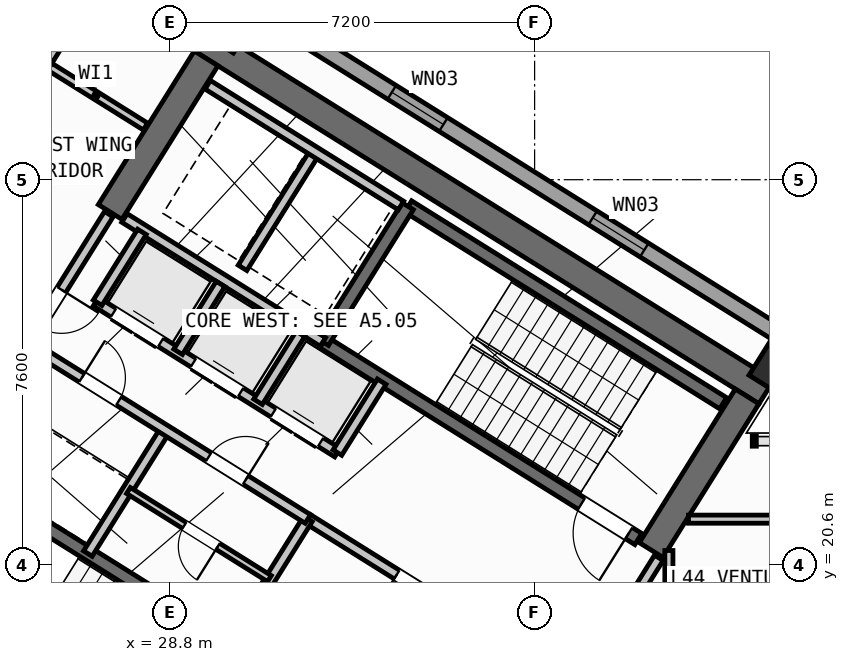
"""IFC4 building model, lengths in metres.
Left out: names, types, materials, properties, quantities, classifications, styles, units other than length and angle.
Written with IfcOpenShell. Run it as: python <this file> out.ifc"""

import sys

from ifc_helpers import new_model, si_unit, direction, frame, frame_2d, origin, origin_2d, place, context, subcontext, project, spatial, rectangle, hollow_rectangle, extrude, source, transform, mapped, element, fill, save


model = new_model("IFC4")
c1 = context("Model", 3, precision=1e-05, world=origin(), true_north=direction((0.0, 1.0)))
c2 = subcontext(c1, "Body", "Model", "MODEL_VIEW")
j1 = project(units=[si_unit("LENGTHUNIT", "METRE"), si_unit("PLANEANGLEUNIT", "RADIAN")], contexts=[c1])
p1 = place(None, origin())
s1 = spatial("IfcSite", under=j1, at=p1, CompositionType="ELEMENT")
p2 = place(p1, origin())
s2 = spatial("IfcBuilding", under=s1, at=p2, CompositionType="ELEMENT")
p3 = place(p2, frame((0.0, 0.0, 174.9)))
s3 = spatial("IfcBuildingStorey", under=s2, at=p3, CompositionType="ELEMENT", Elevation=174.9)
p4 = place(p3, frame((40.573, 24.01, 0.0), z_axis=(0.0, 0.0, 1.0), x_axis=(-0.848047359947, 0.529920442413, 0.0)))
e1 = element("IfcWall", 1, at=p4, inside=s3, PredefinedType="SHEAR", context=c2, shape_type="SweptSolid", body=[
    extrude(rectangle(XDim=13.14, YDim=0.55, at=frame_2d((6.57, 0.0))), origin(), (0.0, 0.0, 1.0), 4.22),
])
p5 = place(p3, frame((40.194, 23.922, 0.0), z_axis=(0.0, 0.0, 1.0), x_axis=(-0.529888438328, -0.848067357541, 0.0)))
e2 = element("IfcWall", 2, at=p5, inside=s3, PredefinedType="SHEAR", context=c2, shape_type="SweptSolid", body=[
    extrude(rectangle(XDim=3.575, YDim=0.55, at=frame_2d((1.788, 0.0))), origin(), (0.0, 0.0, 1.0), 4.22),
])
p6 = place(p3, frame((29.517, 30.594, 0.0), z_axis=(0.0, 0.0, 1.0), x_axis=(-0.529906864564, -0.848055844204, 0.0)))
e3 = element("IfcWall", 3, at=p6, inside=s3, PredefinedType="SHEAR", context=c2, shape_type="SweptSolid", body=[
    extrude(rectangle(XDim=3.575, YDim=0.55, at=frame_2d((1.788, 0.0))), origin(), (0.0, 0.0, 1.0), 4.22),
])
m1 = source(origin(), c2, "Body", "SweptSolid", [
    extrude(hollow_rectangle(XDim=0.8, YDim=0.8, WallThickness=0.032, at=origin_2d()), origin(), (0.0, 0.0, 1.0), 4.5),
])
for number, where, z_axis, x_axis in (
    (4, (40.783, 24.469, 0.0), (0.0, 0.0, 1.0), (-0.848, 0.53, 0.0)),
    (5, (29.928, 31.251, 0.0), (0.0, 0.0, 1.0), (-0.848, 0.53, 0.0)),
):
    element("IfcColumn", number, at=place(p3, frame(where, z_axis=z_axis, x_axis=x_axis)), inside=s3, PredefinedType="COLUMN", context=c2, shape_type="MappedRepresentation", body=[
        mapped(m1, transform((0.0, 0.0, 0.0), scale=1.0)),
    ])
p7 = place(p3, frame((29.268, 6.429, 0.0), z_axis=(0.0, 0.0, 1.0), x_axis=(-0.848049971435, 0.529916263149, 0.0)))
e6 = element("IfcWall", 6, at=p7, inside=s3, PredefinedType="STANDARD", context=c2, shape_type="SweptSolid", body=[
    extrude(rectangle(XDim=31.588, YDim=0.32, at=frame_2d((15.794, 0.0))), origin(), (0.0, 0.0, 1.0), 4.22),
])
p8 = place(p7, frame((27.641, 0.0, 0.0)))
e7 = element("IfcOpeningElement", 7, at=p8, cuts=e6, PredefinedType="OPENING", context=c2, shape_type="SweptSolid", body=[
    extrude(rectangle(XDim=1.2, YDim=2.15, at=frame_2d((0.6, 1.075))), frame((0.0, 0.17, 0.0), z_axis=(0.0, -1.0, 0.0), x_axis=(1.0, 0.0, 0.0)), (0.0, 0.0, 1.0), 0.34),
])
p9 = place(p7, frame((2.954, 0.0, 0.8)))
e8 = element("IfcOpeningElement", 8, at=p9, cuts=e6, PredefinedType="OPENING", context=c2, shape_type="SweptSolid", body=[
    extrude(rectangle(XDim=2.1, YDim=1.55, at=frame_2d((1.05, 0.775))), frame((0.0, 0.17, 0.0), z_axis=(0.0, -1.0, 0.0), x_axis=(1.0, 0.0, 0.0)), (0.0, 0.0, 1.0), 0.34),
])
p10 = place(p7, frame((8.253, 0.0, 0.8)))
e9 = element("IfcOpeningElement", 9, at=p10, cuts=e6, PredefinedType="OPENING", context=c2, shape_type="SweptSolid", body=[
    extrude(rectangle(XDim=2.1, YDim=1.55, at=frame_2d((1.05, 0.775))), frame((0.0, 0.17, 0.0), z_axis=(0.0, -1.0, 0.0), x_axis=(1.0, 0.0, 0.0)), (0.0, 0.0, 1.0), 0.34),
])
p11 = place(p7, frame((20.2, 0.0, 1.0)))
e10 = element("IfcOpeningElement", 10, at=p11, cuts=e6, PredefinedType="OPENING", context=c2, shape_type="SweptSolid", body=[
    extrude(rectangle(XDim=0.9, YDim=1.25, at=frame_2d((0.45, 0.625))), frame((0.0, 0.17, 0.0), z_axis=(0.0, -1.0, 0.0), x_axis=(1.0, 0.0, 0.0)), (0.0, 0.0, 1.0), 0.34),
])
p12 = place(p3, frame((14.138, 41.825, 0.0), z_axis=(0.0, 0.0, 1.0), x_axis=(0.848046498049, -0.529921821731, 0.0)))
e11 = element("IfcWall", 11, at=p12, inside=s3, PredefinedType="STANDARD", context=c2, shape_type="SweptSolid", body=[
    extrude(rectangle(XDim=31.588, YDim=0.32, at=frame_2d((15.794, 0.0))), origin(), (0.0, 0.0, 1.0), 4.22),
])
p13 = place(p12, frame((3.339, 0.0, 0.0)))
e12 = element("IfcOpeningElement", 12, at=p13, cuts=e11, PredefinedType="OPENING", context=c2, shape_type="SweptSolid", body=[
    extrude(rectangle(XDim=1.05, YDim=2.15, at=frame_2d((0.525, 1.075))), frame((0.0, 0.17, 0.0), z_axis=(0.0, -1.0, 0.0), x_axis=(1.0, 0.0, 0.0)), (0.0, 0.0, 1.0), 0.34),
])
p14 = place(p12, frame((1.819, 0.0, 1.0)))
e13 = element("IfcOpeningElement", 13, at=p14, cuts=e11, PredefinedType="OPENING", context=c2, shape_type="SweptSolid", body=[
    extrude(rectangle(XDim=0.9, YDim=1.25, at=frame_2d((0.45, 0.625))), frame((0.0, 0.17, 0.0), z_axis=(0.0, -1.0, 0.0), x_axis=(1.0, 0.0, 0.0)), (0.0, 0.0, 1.0), 0.34),
])
p15 = place(p12, frame((8.494, 0.0, 0.85)))
e14 = element("IfcOpeningElement", 14, at=p15, cuts=e11, PredefinedType="OPENING", context=c2, shape_type="SweptSolid", body=[
    extrude(rectangle(XDim=1.8, YDim=1.5, at=frame_2d((0.9, 0.75))), frame((0.0, 0.17, 0.0), z_axis=(0.0, -1.0, 0.0), x_axis=(1.0, 0.0, 0.0)), (0.0, 0.0, 1.0), 0.34),
])
p16 = place(p12, frame((14.636, 0.0, 1.0)))
e15 = element("IfcOpeningElement", 15, at=p16, cuts=e11, PredefinedType="OPENING", context=c2, shape_type="SweptSolid", body=[
    extrude(rectangle(XDim=0.9, YDim=1.25, at=frame_2d((0.45, 0.625))), frame((0.0, 0.17, 0.0), z_axis=(0.0, -1.0, 0.0), x_axis=(1.0, 0.0, 0.0)), (0.0, 0.0, 1.0), 0.34),
])
p17 = place(p12, frame((22.456, 0.0, 0.95)))
e16 = element("IfcOpeningElement", 16, at=p17, cuts=e11, PredefinedType="OPENING", context=c2, shape_type="SweptSolid", body=[
    extrude(rectangle(XDim=1.2, YDim=1.4, at=frame_2d((0.6, 0.7))), frame((0.0, 0.17, 0.0), z_axis=(0.0, -1.0, 0.0), x_axis=(1.0, 0.0, 0.0)), (0.0, 0.0, 1.0), 0.34),
])
p18 = place(p12, frame((27.131, 0.0, 0.95)))
e17 = element("IfcOpeningElement", 17, at=p18, cuts=e11, PredefinedType="OPENING", context=c2, shape_type="SweptSolid", body=[
    extrude(rectangle(XDim=1.2, YDim=1.4, at=frame_2d((0.6, 0.7))), frame((0.0, 0.17, 0.0), z_axis=(0.0, -1.0, 0.0), x_axis=(1.0, 0.0, 0.0)), (0.0, 0.0, 1.0), 0.34),
])
p19 = place(p3, frame((31.28, 18.261, 0.0), z_axis=(0.0, 0.0, 1.0), x_axis=(-0.848051618787, 0.529913626805, 0.0)))
e18 = element("IfcWall", 18, at=p19, inside=s3, PredefinedType="SHEAR", context=c2, shape_type="SweptSolid", body=[
    extrude(rectangle(XDim=7.46, YDim=0.26, at=frame_2d((3.73, 0.0))), origin(), (0.0, 0.0, 1.0), 4.22),
])
p20 = place(p19, frame((0.36, 0.0, 0.0)))
e19 = element("IfcOpeningElement", 19, at=p20, cuts=e18, PredefinedType="OPENING", context=c2, shape_type="SweptSolid", body=[
    extrude(rectangle(XDim=0.86, YDim=2.05, at=frame_2d((0.43, 1.025))), frame((0.0, 0.14, 0.0), z_axis=(0.0, -1.0, 0.0), x_axis=(1.0, 0.0, 0.0)), (0.0, 0.0, 1.0), 0.28),
])
p21 = place(p3, frame((39.721, 23.788, 0.0), z_axis=(0.0, 0.0, 1.0), x_axis=(-0.848054434086, 0.529909121291, 0.0)))
e20 = element("IfcWall", 20, at=p21, inside=s3, PredefinedType="SHEAR", context=c2, shape_type="SweptSolid", body=[
    extrude(rectangle(XDim=7.33, YDim=0.26, at=frame_2d((3.665, 0.0))), origin(), (0.0, 0.0, 1.0), 4.22),
])
p22 = place(p3, frame((38.046, 21.108, 0.0), z_axis=(0.0, 0.0, 1.0), x_axis=(-0.848054434086, 0.529909121291, 0.0)))
e21 = element("IfcWall", 21, at=p22, inside=s3, PredefinedType="SHEAR", context=c2, shape_type="SweptSolid", body=[
    extrude(rectangle(XDim=7.33, YDim=0.26, at=frame_2d((3.665, 0.0))), origin(), (0.0, 0.0, 1.0), 4.22),
])
p23 = place(p22, frame((0.22, 0.0, 0.0)))
e22 = element("IfcOpeningElement", 22, at=p23, cuts=e21, PredefinedType="OPENING", context=c2, shape_type="SweptSolid", body=[
    extrude(rectangle(XDim=1.1, YDim=2.1, at=frame_2d((0.55, 1.05))), frame((0.0, 0.14, 0.0), z_axis=(0.0, -1.0, 0.0), x_axis=(1.0, 0.0, 0.0)), (0.0, 0.0, 1.0), 0.28),
])
p24 = place(p3, frame((33.496, 27.677, 0.0), z_axis=(0.0, 0.0, 1.0), x_axis=(-0.529908658664, -0.84805472316, 0.0)))
e23 = element("IfcWall", 23, at=p24, inside=s3, PredefinedType="SHEAR", context=c2, shape_type="SweptSolid", body=[
    extrude(rectangle(XDim=3.16, YDim=0.26, at=frame_2d((1.58, 0.0))), origin(), (0.0, 0.0, 1.0), 4.22),
])
p25 = place(p3, frame((36.417, 18.447, 0.0), z_axis=(0.0, 0.0, 1.0), x_axis=(-0.848064879198, 0.529892404805, 0.0)))
e24 = element("IfcWall", 24, at=p25, inside=s3, PredefinedType="STANDARD", context=c2, shape_type="SweptSolid", body=[
    extrude(rectangle(XDim=5.768, YDim=0.2, at=frame_2d((2.884, 0.0))), origin(), (0.0, 0.0, 1.0), 4.21),
])
p26 = place(p25, frame((2.548, 0.0, 0.0)))
e25 = element("IfcOpeningElement", 25, at=p26, cuts=e24, PredefinedType="OPENING", context=c2, shape_type="SweptSolid", body=[
    extrude(rectangle(XDim=1.15, YDim=2.1, at=frame_2d((0.575, 1.05))), frame((0.0, 0.11, 0.0), z_axis=(0.0, -1.0, 0.0), x_axis=(1.0, 0.0, 0.0)), (0.0, 0.0, 1.0), 0.22),
])
p27 = place(p3, frame((31.822, 24.998, 0.0), z_axis=(0.0, 0.0, 1.0), x_axis=(-0.848036912365, 0.52993716162, 0.0)))
e26 = element("IfcWall", 26, at=p27, inside=s3, PredefinedType="STANDARD", context=c2, shape_type="SweptSolid", body=[
    extrude(rectangle(XDim=4.618, YDim=0.2, at=frame_2d((2.309, 0.0))), origin(), (0.0, 0.0, 1.0), 4.21),
])
p28 = place(p3, frame((32.108, 22.814, 0.0), z_axis=(0.0, 0.0, 1.0), x_axis=(-0.848042229521, 0.529928652696, 0.0)))
e27 = element("IfcWall", 27, at=p28, inside=s3, PredefinedType="STANDARD", context=c2, shape_type="SweptSolid", body=[
    extrude(rectangle(XDim=5.62, YDim=0.2, at=frame_2d((2.81, 0.0))), origin(), (0.0, 0.0, 1.0), 4.21),
])
p29 = place(p28, frame((0.39, 0.0, 0.0)))
e28 = element("IfcOpeningElement", 28, at=p29, cuts=e27, PredefinedType="OPENING", context=c2, shape_type="SweptSolid", body=[
    extrude(rectangle(XDim=1.1, YDim=2.15, at=frame_2d((0.55, 1.075))), frame((0.0, 0.11, 0.0), z_axis=(0.0, -1.0, 0.0), x_axis=(1.0, 0.0, 0.0)), (0.0, 0.0, 1.0), 0.22),
])
p30 = place(p28, frame((2.25, 0.0, 0.0)))
e29 = element("IfcOpeningElement", 29, at=p30, cuts=e27, PredefinedType="OPENING", context=c2, shape_type="SweptSolid", body=[
    extrude(rectangle(XDim=1.1, YDim=2.15, at=frame_2d((0.55, 1.075))), frame((0.0, 0.11, 0.0), z_axis=(0.0, -1.0, 0.0), x_axis=(1.0, 0.0, 0.0)), (0.0, 0.0, 1.0), 0.22),
])
p31 = place(p28, frame((4.11, 0.0, 0.0)))
e30 = element("IfcOpeningElement", 30, at=p31, cuts=e27, PredefinedType="OPENING", context=c2, shape_type="SweptSolid", body=[
    extrude(rectangle(XDim=1.1, YDim=2.15, at=frame_2d((0.55, 1.075))), frame((0.0, 0.11, 0.0), z_axis=(0.0, -1.0, 0.0), x_axis=(1.0, 0.0, 0.0)), (0.0, 0.0, 1.0), 0.22),
])
p32 = place(p3, frame((32.982, 24.213, 0.0), z_axis=(0.0, 0.0, 1.0), x_axis=(-0.529839334948, -0.84809803628, 0.0)))
e31 = element("IfcWall", 31, at=p32, inside=s3, PredefinedType="STANDARD", context=c2, shape_type="SweptSolid", body=[
    extrude(rectangle(XDim=1.65, YDim=0.2, at=frame_2d((0.825, 0.0))), origin(), (0.0, 0.0, 1.0), 4.21),
])
p33 = place(p3, frame((28.25, 27.17, 0.0), z_axis=(0.0, 0.0, 1.0), x_axis=(-0.529905827651, -0.848056492117, 0.0)))
e32 = element("IfcWall", 32, at=p33, inside=s3, PredefinedType="STANDARD", context=c2, shape_type="SweptSolid", body=[
    extrude(rectangle(XDim=1.65, YDim=0.2, at=frame_2d((0.825, 0.0))), origin(), (0.0, 0.0, 1.0), 4.21),
])
p34 = place(p3, frame((31.645, 28.716, 0.0), z_axis=(0.0, 0.0, 1.0), x_axis=(-0.52986693015, -0.848080795876, 0.0)))
e33 = element("IfcWall", 33, at=p34, inside=s3, PredefinedType="STANDARD", context=c2, shape_type="SweptSolid", body=[
    extrude(rectangle(XDim=2.66, YDim=0.2, at=frame_2d((1.33, 0.0))), origin(), (0.0, 0.0, 1.0), 4.21),
])
p35 = place(p3, frame((33.363, 27.69, 0.0), z_axis=(0.0, 0.0, 1.0), x_axis=(-0.848047090064, 0.529920874315, 0.0)))
e34 = element("IfcWall", 34, at=p35, inside=s3, PredefinedType="STANDARD", context=c2, shape_type="SweptSolid", body=[
    extrude(rectangle(XDim=4.498, YDim=0.2, at=frame_2d((2.249, 0.0))), origin(), (0.0, 0.0, 1.0), 4.21),
])
for number, where, z_axis, x_axis in (
    (35, (31.379, 25.156, 0.0), (0.0, 0.0, 1.0), (-0.53, -0.848, 0.0)),
    (36, (29.801, 26.142, 0.0), (0.0, 0.0, 1.0), (-0.53, -0.848, 0.0)),
):
    element("IfcWall", number, at=place(p3, frame(where, z_axis=z_axis, x_axis=x_axis)), inside=s3, PredefinedType="STANDARD", context=c2, shape_type="SweptSolid", body=[
        extrude(rectangle(XDim=1.58, YDim=0.2, at=frame_2d((0.79, 0.0))), origin(), (0.0, 0.0, 1.0), 4.21),
    ])
for number, where, z_axis, x_axis in (
    (37, (31.525, 21.504, 0.0), (0.0, 0.0, 1.0), (-0.53, -0.848, 0.0)),
    (38, (28.71, 23.263, 0.0), (0.0, 0.0, 1.0), (-0.53, -0.848, 0.0)),
):
    element("IfcWall", number, at=place(p3, frame(where, z_axis=z_axis, x_axis=x_axis)), inside=s3, PredefinedType="STANDARD", context=c2, shape_type="SweptSolid", body=[
        extrude(rectangle(XDim=2.88, YDim=0.2, at=frame_2d((1.44, 0.0))), origin(), (0.0, 0.0, 1.0), 4.21),
    ])
p36 = place(p3, frame((31.525, 21.504, 0.0), z_axis=(0.0, 0.0, 1.0), x_axis=(-0.848040211232, 0.529931882541, 0.0)))
e39 = element("IfcWall", 39, at=p36, inside=s3, PredefinedType="STANDARD", context=c2, shape_type="SweptSolid", body=[
    extrude(rectangle(XDim=6.218, YDim=0.2, at=frame_2d((3.109, 0.0))), origin(), (0.0, 0.0, 1.0), 4.21),
])
p37 = place(p36, frame((4.4, 0.0, 0.0)))
e40 = element("IfcOpeningElement", 40, at=p37, cuts=e39, PredefinedType="OPENING", context=c2, shape_type="SweptSolid", body=[
    extrude(rectangle(XDim=0.86, YDim=2.05, at=frame_2d((0.43, 1.025))), frame((0.0, 0.11, 0.0), z_axis=(0.0, -1.0, 0.0), x_axis=(1.0, 0.0, 0.0)), (0.0, 0.0, 1.0), 0.22),
])
p38 = place(p36, frame((1.45, 0.0, 0.0)))
e41 = element("IfcOpeningElement", 41, at=p38, cuts=e39, PredefinedType="OPENING", context=c2, shape_type="SweptSolid", body=[
    extrude(rectangle(XDim=0.86, YDim=2.05, at=frame_2d((0.43, 1.025))), frame((0.0, 0.11, 0.0), z_axis=(0.0, -1.0, 0.0), x_axis=(1.0, 0.0, 0.0)), (0.0, 0.0, 1.0), 0.22),
])
p39 = place(p3, frame((30.766, 20.327, 0.0), z_axis=(0.0, 0.0, 1.0), x_axis=(-0.848052663127, 0.529911955482, 0.0)))
e42 = element("IfcWall", 42, at=p39, inside=s3, PredefinedType="PLUMBINGWALL", context=c2, shape_type="SweptSolid", body=[
    extrude(rectangle(XDim=3.28, YDim=0.14, at=frame_2d((1.64, 0.0))), origin(), (0.0, 0.0, 1.0), 4.21),
])
p40 = place(p39, frame((1.2, 0.0, 0.0)))
e43 = element("IfcOpeningElement", 43, at=p40, cuts=e42, PredefinedType="OPENING", context=c2, shape_type="SweptSolid", body=[
    extrude(rectangle(XDim=0.78, YDim=2.05, at=frame_2d((0.39, 1.025))), frame((0.0, 0.08, 0.0), z_axis=(0.0, -1.0, 0.0), x_axis=(1.0, 0.0, 0.0)), (0.0, 0.0, 1.0), 0.16),
])
p41 = place(p3, frame((27.596, 27.52, 0.0), z_axis=(0.0, 0.0, 1.0), x_axis=(-0.529865479138, -0.848081702443, 0.0)))
e44 = element("IfcWall", 44, at=p41, inside=s3, PredefinedType="STANDARD", context=c2, shape_type="SweptSolid", body=[
    extrude(rectangle(XDim=2.96, YDim=0.2, at=frame_2d((1.48, 0.0))), origin(), (0.0, 0.0, 1.0), 2.395),
])
p42 = place(p41, frame((1.76, 0.0, 0.0)))
e45 = element("IfcOpeningElement", 45, at=p42, cuts=e44, PredefinedType="OPENING", context=c2, shape_type="SweptSolid", body=[
    extrude(rectangle(XDim=0.86, YDim=2.05, at=frame_2d((0.43, 1.025))), frame((0.0, 0.11, 0.0), z_axis=(0.0, -1.0, 0.0), x_axis=(1.0, 0.0, 0.0)), (0.0, 0.0, 1.0), 0.22),
])
p43 = place(p3, frame((28.321, 29.249, 0.0), z_axis=(0.0, 0.0, 1.0), x_axis=(-0.848028015797, 0.529951398172, 0.0)))
e46 = element("IfcWall", 46, at=p43, inside=s3, PredefinedType="PARTITIONING", context=c2, shape_type="SweptSolid", body=[
    extrude(rectangle(XDim=2.308, YDim=0.16, at=frame_2d((1.154, 0.0))), origin(), (0.0, 0.0, 1.0), 4.21),
])
p44 = place(p3, frame((27.953, 33.016, 0.0), z_axis=(0.0, 0.0, 1.0), x_axis=(-0.529874576144, -0.848076018737, 0.0)))
e47 = element("IfcWall", 47, at=p44, inside=s3, PredefinedType="PARTITIONING", context=c2, shape_type="SweptSolid", body=[
    extrude(rectangle(XDim=3.0, YDim=0.16, at=frame_2d((1.5, 0.0))), origin(), (0.0, 0.0, 1.0), 4.21),
])
p45 = place(p3, frame((38.451, 20.737, 0.0), z_axis=(0.0, 0.0, 1.0), x_axis=(-0.529924799939, -0.848044637038, 0.0)))
e48 = element("IfcWall", 48, at=p45, inside=s3, PredefinedType="STANDARD", context=c2, shape_type="SweptSolid", body=[
    extrude(rectangle(XDim=2.96, YDim=0.2, at=frame_2d((1.48, 0.0))), origin(), (0.0, 0.0, 1.0), 2.395),
])
p46 = place(p45, frame((1.46, 0.0, 0.0)))
e49 = element("IfcOpeningElement", 49, at=p46, cuts=e48, PredefinedType="OPENING", context=c2, shape_type="SweptSolid", body=[
    extrude(rectangle(XDim=0.86, YDim=2.05, at=frame_2d((0.43, 1.025))), frame((0.0, 0.11, 0.0), z_axis=(0.0, -1.0, 0.0), x_axis=(1.0, 0.0, 0.0)), (0.0, 0.0, 1.0), 0.22),
])
p47 = place(p3, frame((38.65, 17.93, 0.0), z_axis=(0.0, 0.0, 1.0), x_axis=(0.0, 1.0, 0.0)))
e50 = element("IfcWall", 50, at=p47, inside=s3, PredefinedType="PARTITIONING", context=c2, shape_type="SweptSolid", body=[
    extrude(rectangle(XDim=2.951, YDim=0.16, at=frame_2d((1.476, 0.0))), origin(), (0.0, 0.0, 1.0), 4.21),
])
p48 = place(p3, frame((39.037, 21.5, 0.0), z_axis=(0.0, 0.0, 1.0), x_axis=(1.0, 0.0, 0.0)))
e51 = element("IfcWall", 51, at=p48, inside=s3, PredefinedType="PARTITIONING", context=c2, shape_type="SweptSolid", body=[
    extrude(rectangle(XDim=7.215, YDim=0.16, at=frame_2d((3.607, 0.0))), origin(), (0.0, 0.0, 1.0), 4.21),
])
m2 = source(origin(), c2, "Body", "SweptSolid", [
    extrude(rectangle(XDim=1.2, YDim=1.4, at=frame_2d((0.6, 0.7))), frame((0.0, 0.03, 0.0), z_axis=(0.0, -1.0, 0.0), x_axis=(1.0, 0.0, 0.0)), (0.0, 0.0, 1.0), 0.06),
])
p49 = place(p17, origin())
e52 = element("IfcWindow", 52, at=p49, inside=s3, PartitioningType="SINGLE_PANEL", PredefinedType="WINDOW", context=c2, shape_type="MappedRepresentation", body=[
    mapped(m2, transform((0.0, 0.0, 0.0), scale=1.0)),
])
fill(e16, e52)
p50 = place(p18, origin())
e53 = element("IfcWindow", 53, at=p50, inside=s3, PartitioningType="SINGLE_PANEL", PredefinedType="WINDOW", context=c2, shape_type="MappedRepresentation", body=[
    mapped(m2, transform((0.0, 0.0, 0.0), scale=1.0)),
])
fill(e17, e53)
m3 = source(origin(), c2, "Body", "SweptSolid", [
    extrude(rectangle(XDim=1.1, YDim=2.1, at=frame_2d((0.55, 1.05))), frame((0.0, 0.025, 0.0), z_axis=(0.0, -1.0, 0.0), x_axis=(1.0, 0.0, 0.0)), (0.0, 0.0, 1.0), 0.05),
])
p51 = place(p23, origin())
e54 = element("IfcDoor", 54, at=p51, inside=s3, OperationType="SINGLE_SWING_LEFT", PredefinedType="DOOR", context=c2, shape_type="MappedRepresentation", body=[
    mapped(m3, transform((0.0, 0.0, 0.0), scale=1.0)),
])
fill(e22, e54)
m4 = source(origin(), c2, "Body", "SweptSolid", [
    extrude(rectangle(XDim=1.15, YDim=2.1, at=frame_2d((0.575, 1.05))), frame((0.0, 0.025, 0.0), z_axis=(0.0, -1.0, 0.0), x_axis=(1.0, 0.0, 0.0)), (0.0, 0.0, 1.0), 0.05),
])
p52 = place(p26, origin())
e55 = element("IfcDoor", 55, at=p52, inside=s3, OperationType="SINGLE_SWING_RIGHT", PredefinedType="DOOR", context=c2, shape_type="MappedRepresentation", body=[
    mapped(m4, transform((0.0, 0.0, 0.0), scale=1.0)),
])
fill(e25, e55)
m5 = source(origin(), c2, "Body", "SweptSolid", [
    extrude(rectangle(XDim=1.1, YDim=2.15, at=frame_2d((0.55, 1.075))), frame((0.0, 0.025, 0.0), z_axis=(0.0, -1.0, 0.0), x_axis=(1.0, 0.0, 0.0)), (0.0, 0.0, 1.0), 0.05),
])
p53 = place(p29, origin())
e56 = element("IfcDoor", 56, at=p53, inside=s3, OperationType="DOUBLE_DOOR_SLIDING", PredefinedType="DOOR", context=c2, shape_type="MappedRepresentation", body=[
    mapped(m5, transform((0.0, 0.0, 0.0), scale=1.0)),
])
fill(e28, e56)
p54 = place(p30, origin())
e57 = element("IfcDoor", 57, at=p54, inside=s3, OperationType="DOUBLE_DOOR_SLIDING", PredefinedType="DOOR", context=c2, shape_type="MappedRepresentation", body=[
    mapped(m5, transform((0.0, 0.0, 0.0), scale=1.0)),
])
fill(e29, e57)
p55 = place(p31, origin())
e58 = element("IfcDoor", 58, at=p55, inside=s3, OperationType="DOUBLE_DOOR_SLIDING", PredefinedType="DOOR", context=c2, shape_type="MappedRepresentation", body=[
    mapped(m5, transform((0.0, 0.0, 0.0), scale=1.0)),
])
fill(e30, e58)
m6 = source(origin(), c2, "Body", "SweptSolid", [
    extrude(rectangle(XDim=0.86, YDim=2.05, at=frame_2d((0.43, 1.025))), frame((0.0, 0.025, 0.0), z_axis=(0.0, -1.0, 0.0), x_axis=(1.0, 0.0, 0.0)), (0.0, 0.0, 1.0), 0.05),
])
p56 = place(p37, frame((0.86, 0.0, 0.0), z_axis=(0.0, 0.0, 1.0), x_axis=(-1.0, 0.0, 0.0)))
e59 = element("IfcDoor", 59, at=p56, inside=s3, OperationType="SINGLE_SWING_LEFT", PredefinedType="DOOR", context=c2, shape_type="MappedRepresentation", body=[
    mapped(m6, transform((0.0, 0.0, 0.0), scale=1.0)),
])
fill(e40, e59)
p57 = place(p38, frame((0.86, 0.0, 0.0), z_axis=(0.0, 0.0, 1.0), x_axis=(-1.0, 0.0, 0.0)))
e60 = element("IfcDoor", 60, at=p57, inside=s3, OperationType="SINGLE_SWING_RIGHT", PredefinedType="DOOR", context=c2, shape_type="MappedRepresentation", body=[
    mapped(m6, transform((0.0, 0.0, 0.0), scale=1.0)),
])
fill(e41, e60)
m7 = source(origin(), c2, "Body", "SweptSolid", [
    extrude(rectangle(XDim=0.78, YDim=2.05, at=frame_2d((0.39, 1.025))), frame((0.0, 0.025, 0.0), z_axis=(0.0, -1.0, 0.0), x_axis=(1.0, 0.0, 0.0)), (0.0, 0.0, 1.0), 0.05),
])
p58 = place(p40, origin())
e61 = element("IfcDoor", 61, at=p58, inside=s3, OperationType="SINGLE_SWING_LEFT", PredefinedType="DOOR", context=c2, shape_type="MappedRepresentation", body=[
    mapped(m7, transform((0.0, 0.0, 0.0), scale=1.0)),
])
fill(e43, e61)
p59 = place(p42, origin())
e62 = element("IfcDoor", 62, at=p59, inside=s3, OperationType="SINGLE_SWING_LEFT", PredefinedType="DOOR", context=c2, shape_type="MappedRepresentation", body=[
    mapped(m6, transform((0.0, 0.0, 0.0), scale=1.0)),
])
fill(e45, e62)
save(model, sys.argv[1])
